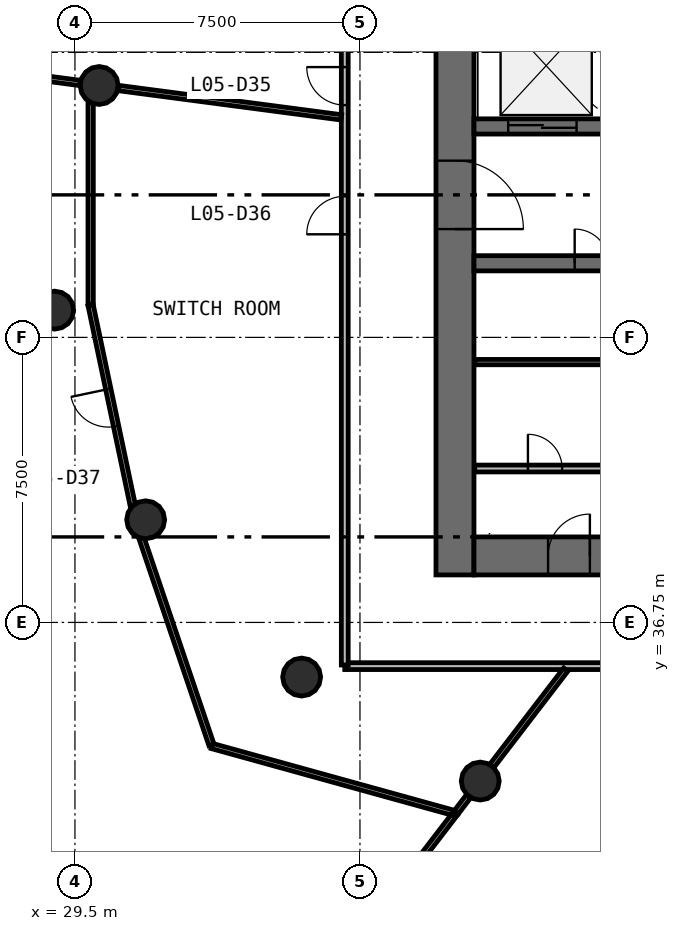
"""IFC4 building model, lengths in metres.
Left out: names, types, materials, properties, quantities, classifications, styles, units other than length and angle.
Written with IfcOpenShell. Run it as: python <this file> out.ifc"""

import sys

from ifc_helpers import new_model, si_unit, direction, frame, frame_2d, origin, origin_2d, place, context, subcontext, project, spatial, rectangle, circle, extrude, source, transform, mapped, element, fill, save


model = new_model("IFC4")
c1 = context("Model", 3, precision=1e-05, world=origin(), true_north=direction((0.0, 1.0)))
c2 = subcontext(c1, "Body", "Model", "MODEL_VIEW")
j1 = project(units=[si_unit("LENGTHUNIT", "METRE"), si_unit("PLANEANGLEUNIT", "RADIAN")], contexts=[c1])
p1 = place(None, origin())
s1 = spatial("IfcSite", under=j1, at=p1, CompositionType="ELEMENT")
p2 = place(p1, origin())
s2 = spatial("IfcBuilding", under=s1, at=p2, CompositionType="ELEMENT")
p3 = place(p2, frame((0.0, 0.0, 22.6)))
s3 = spatial("IfcBuildingStorey", under=s2, at=p3, CompositionType="ELEMENT", Elevation=22.6)
p4 = place(p3, frame((39.5, 58.0, 0.0), z_axis=(0.0, 0.0, 1.0), x_axis=(0.0, -1.0, 0.0)))
e1 = element("IfcWall", 1, at=p4, inside=s3, PredefinedType="SHEAR", context=c2, shape_type="SweptSolid", body=[
    extrude(rectangle(XDim=20.0, YDim=1.0, at=frame_2d((10.0, 0.0))), origin(), (0.0, 0.0, 1.0), 4.4),
])
p5 = place(p4, frame((9.1, 0.0, 0.0)))
e2 = element("IfcOpeningElement", 2, at=p5, cuts=e1, PredefinedType="OPENING", context=c2, shape_type="SweptSolid", body=[
    extrude(rectangle(XDim=1.8, YDim=2.1, at=frame_2d((0.9, 1.05))), frame((0.0, 0.51, 0.0), z_axis=(0.0, -1.0, 0.0), x_axis=(1.0, 0.0, 0.0)), (0.0, 0.0, 1.0), 1.02),
])
p6 = place(p3, frame((40.0, 38.5, 0.0), z_axis=(0.0, 0.0, 1.0), x_axis=(1.0, 0.0, 0.0)))
e3 = element("IfcWall", 3, at=p6, inside=s3, PredefinedType="SHEAR", context=c2, shape_type="SweptSolid", body=[
    extrude(rectangle(XDim=24.0, YDim=1.0, at=frame_2d((12.0, 0.0))), origin(), (0.0, 0.0, 1.0), 4.4),
])
p7 = place(p6, frame((21.45, 0.0, 0.0)))
e4 = element("IfcOpeningElement", 4, at=p7, cuts=e3, PredefinedType="OPENING", context=c2, shape_type="SweptSolid", body=[
    extrude(rectangle(XDim=1.1, YDim=2.1, at=frame_2d((0.55, 1.05))), frame((0.0, 0.51, 0.0), z_axis=(0.0, -1.0, 0.0), x_axis=(1.0, 0.0, 0.0)), (0.0, 0.0, 1.0), 1.02),
])
p8 = place(p6, frame((1.95, 0.0, 0.0)))
e5 = element("IfcOpeningElement", 5, at=p8, cuts=e3, PredefinedType="OPENING", context=c2, shape_type="SweptSolid", body=[
    extrude(rectangle(XDim=1.1, YDim=2.1, at=frame_2d((0.55, 1.05))), frame((0.0, 0.51, 0.0), z_axis=(0.0, -1.0, 0.0), x_axis=(1.0, 0.0, 0.0)), (0.0, 0.0, 1.0), 1.02),
])
p9 = place(p3, frame((40.0, 49.8, 0.0), z_axis=(0.0, 0.0, 1.0), x_axis=(1.0, 0.0, 0.0)))
e6 = element("IfcWall", 6, at=p9, inside=s3, PredefinedType="SHEAR", context=c2, shape_type="SweptSolid", body=[
    extrude(rectangle(XDim=24.0, YDim=0.4, at=frame_2d((12.0, 0.0))), origin(), (0.0, 0.0, 1.0), 4.4),
])
p10 = place(p9, frame((4.5, 0.0, 0.0)))
e7 = element("IfcOpeningElement", 7, at=p10, cuts=e6, PredefinedType="OPENING", context=c2, shape_type="SweptSolid", body=[
    extrude(rectangle(XDim=1.1, YDim=2.1, at=frame_2d((0.55, 1.05))), frame((0.0, 0.21, 0.0), z_axis=(0.0, -1.0, 0.0), x_axis=(1.0, 0.0, 0.0)), (0.0, 0.0, 1.0), 0.42),
])
p11 = place(p9, frame((7.0, 0.0, 0.0)))
e8 = element("IfcOpeningElement", 8, at=p11, cuts=e6, PredefinedType="OPENING", context=c2, shape_type="SweptSolid", body=[
    extrude(rectangle(XDim=1.1, YDim=2.1, at=frame_2d((0.55, 1.05))), frame((0.0, 0.21, 0.0), z_axis=(0.0, -1.0, 0.0), x_axis=(1.0, 0.0, 0.0)), (0.0, 0.0, 1.0), 0.42),
])
p12 = place(p9, frame((9.5, 0.0, 0.0)))
e9 = element("IfcOpeningElement", 9, at=p12, cuts=e6, PredefinedType="OPENING", context=c2, shape_type="SweptSolid", body=[
    extrude(rectangle(XDim=1.1, YDim=2.1, at=frame_2d((0.55, 1.05))), frame((0.0, 0.21, 0.0), z_axis=(0.0, -1.0, 0.0), x_axis=(1.0, 0.0, 0.0)), (0.0, 0.0, 1.0), 0.42),
])
p13 = place(p9, frame((0.9, 0.0, 0.0)))
e10 = element("IfcOpeningElement", 10, at=p13, cuts=e6, PredefinedType="OPENING", context=c2, shape_type="SweptSolid", body=[
    extrude(rectangle(XDim=1.8, YDim=2.4, at=frame_2d((0.9, 1.2))), frame((0.0, 0.21, 0.0), z_axis=(0.0, -1.0, 0.0), x_axis=(1.0, 0.0, 0.0)), (0.0, 0.0, 1.0), 0.42),
])
p14 = place(p9, frame((20.45, 0.0, 0.0)))
e11 = element("IfcOpeningElement", 11, at=p14, cuts=e6, PredefinedType="OPENING", context=c2, shape_type="SweptSolid", body=[
    extrude(rectangle(XDim=0.9, YDim=2.1, at=frame_2d((0.45, 1.05))), frame((0.0, 0.21, 0.0), z_axis=(0.0, -1.0, 0.0), x_axis=(1.0, 0.0, 0.0)), (0.0, 0.0, 1.0), 0.42),
])
p15 = place(p9, frame((11.65, 0.0, 0.0)))
e12 = element("IfcOpeningElement", 12, at=p15, cuts=e6, PredefinedType="OPENING", context=c2, shape_type="SweptSolid", body=[
    extrude(rectangle(XDim=0.9, YDim=2.1, at=frame_2d((0.45, 1.05))), frame((0.0, 0.21, 0.0), z_axis=(0.0, -1.0, 0.0), x_axis=(1.0, 0.0, 0.0)), (0.0, 0.0, 1.0), 0.42),
])
p16 = place(p3, frame((40.0, 46.2, 0.0), z_axis=(0.0, 0.0, 1.0), x_axis=(1.0, 0.0, 0.0)))
e13 = element("IfcWall", 13, at=p16, inside=s3, PredefinedType="SHEAR", context=c2, shape_type="SweptSolid", body=[
    extrude(rectangle(XDim=24.0, YDim=0.4, at=frame_2d((12.0, 0.0))), origin(), (0.0, 0.0, 1.0), 4.4),
])
p17 = place(p16, frame((4.5, 0.0, 0.0)))
e14 = element("IfcOpeningElement", 14, at=p17, cuts=e13, PredefinedType="OPENING", context=c2, shape_type="SweptSolid", body=[
    extrude(rectangle(XDim=1.1, YDim=2.1, at=frame_2d((0.55, 1.05))), frame((0.0, 0.21, 0.0), z_axis=(0.0, -1.0, 0.0), x_axis=(1.0, 0.0, 0.0)), (0.0, 0.0, 1.0), 0.42),
])
p18 = place(p16, frame((7.0, 0.0, 0.0)))
e15 = element("IfcOpeningElement", 15, at=p18, cuts=e13, PredefinedType="OPENING", context=c2, shape_type="SweptSolid", body=[
    extrude(rectangle(XDim=1.1, YDim=2.1, at=frame_2d((0.55, 1.05))), frame((0.0, 0.21, 0.0), z_axis=(0.0, -1.0, 0.0), x_axis=(1.0, 0.0, 0.0)), (0.0, 0.0, 1.0), 0.42),
])
p19 = place(p16, frame((9.5, 0.0, 0.0)))
e16 = element("IfcOpeningElement", 16, at=p19, cuts=e13, PredefinedType="OPENING", context=c2, shape_type="SweptSolid", body=[
    extrude(rectangle(XDim=1.1, YDim=2.1, at=frame_2d((0.55, 1.05))), frame((0.0, 0.21, 0.0), z_axis=(0.0, -1.0, 0.0), x_axis=(1.0, 0.0, 0.0)), (0.0, 0.0, 1.0), 0.42),
])
p20 = place(p16, frame((20.45, 0.0, 0.0)))
e17 = element("IfcOpeningElement", 17, at=p20, cuts=e13, PredefinedType="OPENING", context=c2, shape_type="SweptSolid", body=[
    extrude(rectangle(XDim=0.9, YDim=2.1, at=frame_2d((0.45, 1.05))), frame((0.0, 0.21, 0.0), z_axis=(0.0, -1.0, 0.0), x_axis=(1.0, 0.0, 0.0)), (0.0, 0.0, 1.0), 0.42),
])
p21 = place(p16, frame((2.65, 0.0, 0.0)))
e18 = element("IfcOpeningElement", 18, at=p21, cuts=e13, PredefinedType="OPENING", context=c2, shape_type="SweptSolid", body=[
    extrude(rectangle(XDim=0.9, YDim=2.1, at=frame_2d((0.45, 1.05))), frame((0.0, 0.21, 0.0), z_axis=(0.0, -1.0, 0.0), x_axis=(1.0, 0.0, 0.0)), (0.0, 0.0, 1.0), 0.42),
])
p22 = place(p16, frame((11.65, 0.0, 0.0)))
e19 = element("IfcOpeningElement", 19, at=p22, cuts=e13, PredefinedType="OPENING", context=c2, shape_type="SweptSolid", body=[
    extrude(rectangle(XDim=0.9, YDim=2.1, at=frame_2d((0.45, 1.05))), frame((0.0, 0.21, 0.0), z_axis=(0.0, -1.0, 0.0), x_axis=(1.0, 0.0, 0.0)), (0.0, 0.0, 1.0), 0.42),
])
m1 = source(origin(), c2, "Body", "SweptSolid", [
    extrude(circle(Radius=0.5, at=origin_2d()), origin(), (0.0, 0.0, 1.0), 4.4),
])
for number, where, z_axis, x_axis in (
    (20, (30.137, 50.878, 0.0), (0.0, 0.0, 1.0), (1.0, 0.0, 0.0)),
    (21, (28.966, 44.968, 0.0), (0.0, 0.0, 1.0), (1.0, 0.0, 0.0)),
    (22, (31.361, 39.451, 0.0), (0.0, 0.0, 1.0), (1.0, 0.0, 0.0)),
    (23, (35.465, 35.312, 0.0), (0.0, 0.0, 1.0), (1.0, 0.0, 0.0)),
    (24, (40.165, 32.576, 0.0), (0.0, 0.0, 1.0), (1.0, 0.0, 0.0)),
):
    element("IfcColumn", number, at=place(p3, frame(where, z_axis=z_axis, x_axis=x_axis)), inside=s3, PredefinedType="COLUMN", context=c2, shape_type="MappedRepresentation", body=[
        mapped(m1, transform((0.0, 0.0, 0.0), scale=1.0)),
    ])
p23 = place(p3, frame((67.4, 35.6, 0.0), z_axis=(0.0, 0.0, 1.0), x_axis=(-1.0, 0.0, 0.0)))
e25 = element("IfcWall", 25, at=p23, inside=s3, PredefinedType="PARTITIONING", context=c2, shape_type="SweptSolid", body=[
    extrude(rectangle(XDim=30.8, YDim=0.18, at=frame_2d((15.4, 0.0))), origin(), (0.0, 0.0, 1.0), 3.05),
])
p24 = place(p23, frame((14.95, 0.0, 0.0)))
e26 = element("IfcOpeningElement", 26, at=p24, cuts=e25, PredefinedType="OPENING", context=c2, shape_type="SweptSolid", body=[
    extrude(rectangle(XDim=1.0, YDim=2.1, at=frame_2d((0.5, 1.05))), frame((0.0, 0.1, 0.0), z_axis=(0.0, -1.0, 0.0), x_axis=(1.0, 0.0, 0.0)), (0.0, 0.0, 1.0), 0.2),
])
p25 = place(p23, frame((12.55, 0.0, 0.0)))
e27 = element("IfcOpeningElement", 27, at=p25, cuts=e25, PredefinedType="OPENING", context=c2, shape_type="SweptSolid", body=[
    extrude(rectangle(XDim=1.0, YDim=2.1, at=frame_2d((0.5, 1.05))), frame((0.0, 0.1, 0.0), z_axis=(0.0, -1.0, 0.0), x_axis=(1.0, 0.0, 0.0)), (0.0, 0.0, 1.0), 0.2),
])
p26 = place(p23, frame((8.95, 0.0, 0.0)))
e28 = element("IfcOpeningElement", 28, at=p26, cuts=e25, PredefinedType="OPENING", context=c2, shape_type="SweptSolid", body=[
    extrude(rectangle(XDim=1.0, YDim=2.1, at=frame_2d((0.5, 1.05))), frame((0.0, 0.1, 0.0), z_axis=(0.0, -1.0, 0.0), x_axis=(1.0, 0.0, 0.0)), (0.0, 0.0, 1.0), 0.2),
])
p27 = place(p3, frame((36.6, 35.63, 0.0), z_axis=(0.0, 0.0, 1.0), x_axis=(0.0, 1.0, 0.0)))
e29 = element("IfcWall", 29, at=p27, inside=s3, PredefinedType="PARTITIONING", context=c2, shape_type="SweptSolid", body=[
    extrude(rectangle(XDim=23.583, YDim=0.18, at=frame_2d((11.791, 0.0))), origin(), (0.0, 0.0, 1.0), 3.05),
])
p28 = place(p27, frame((14.732, 0.0, 0.0)))
e30 = element("IfcOpeningElement", 30, at=p28, cuts=e29, PredefinedType="OPENING", context=c2, shape_type="SweptSolid", body=[
    extrude(rectangle(XDim=1.0, YDim=2.1, at=frame_2d((0.5, 1.05))), frame((0.0, 0.1, 0.0), z_axis=(0.0, -1.0, 0.0), x_axis=(1.0, 0.0, 0.0)), (0.0, 0.0, 1.0), 0.2),
])
p29 = place(p27, frame((11.333, 0.0, 0.0)))
e31 = element("IfcOpeningElement", 31, at=p29, cuts=e29, PredefinedType="OPENING", context=c2, shape_type="SweptSolid", body=[
    extrude(rectangle(XDim=1.0, YDim=2.1, at=frame_2d((0.5, 1.05))), frame((0.0, 0.1, 0.0), z_axis=(0.0, -1.0, 0.0), x_axis=(1.0, 0.0, 0.0)), (0.0, 0.0, 1.0), 0.2),
])
p30 = place(p3, frame((40.02, 40.8, 0.0), z_axis=(0.0, 0.0, 1.0), x_axis=(1.0, 0.0, 0.0)))
e32 = element("IfcWall", 32, at=p30, inside=s3, PredefinedType="PARTITIONING", context=c2, shape_type="SweptSolid", body=[
    extrude(rectangle(XDim=3.75, YDim=0.18, at=frame_2d((1.875, 0.0))), origin(), (0.0, 0.0, 1.0), 3.95),
])
p31 = place(p30, frame((1.4, 0.0, 0.0)))
e33 = element("IfcOpeningElement", 33, at=p31, cuts=e32, PredefinedType="OPENING", context=c2, shape_type="SweptSolid", body=[
    extrude(rectangle(XDim=0.9, YDim=2.1, at=frame_2d((0.45, 1.05))), frame((0.0, 0.1, 0.0), z_axis=(0.0, -1.0, 0.0), x_axis=(1.0, 0.0, 0.0)), (0.0, 0.0, 1.0), 0.2),
])
p32 = place(p3, frame((29.637, 50.944, 0.0), z_axis=(0.0, 0.0, 1.0), x_axis=(-0.991443306772, 0.130538000051, 0.0)))
e34 = element("IfcWall", 34, at=p32, inside=s3, PredefinedType="PARTITIONING", context=c2, shape_type="SweptSolid", body=[
    extrude(rectangle(XDim=11.195, YDim=0.14, at=frame_2d((5.598, 0.0))), origin(), (0.0, 0.0, 1.0), 3.05),
])
p33 = place(p3, frame((39.512, 31.726, 0.0), z_axis=(0.0, 0.0, 1.0), x_axis=(-0.608766118587, -0.793349741829, 0.0)))
e35 = element("IfcWall", 35, at=p33, inside=s3, PredefinedType="PARTITIONING", context=c2, shape_type="SweptSolid", body=[
    extrude(rectangle(XDim=9.159, YDim=0.14, at=frame_2d((4.58, 0.0))), origin(), (0.0, 0.0, 1.0), 3.05),
])
p34 = place(p3, frame((33.102, 33.499, 0.0), z_axis=(0.0, 0.0, 1.0), x_axis=(0.963800361675, -0.266624947885, 0.0)))
e36 = element("IfcWall", 36, at=p34, inside=s3, PredefinedType="PARTITIONING", context=c2, shape_type="SweptSolid", body=[
    extrude(rectangle(XDim=6.575, YDim=0.14, at=frame_2d((3.288, 0.0))), origin(), (0.0, 0.0, 1.0), 3.05),
])
p35 = place(p3, frame((36.51, 50.039, 0.0), z_axis=(0.0, 0.0, 1.0), x_axis=(-0.991445034615, 0.130524876315, 0.0)))
e37 = element("IfcWall", 37, at=p35, inside=s3, PredefinedType="PARTITIONING", context=c2, shape_type="SweptSolid", body=[
    extrude(rectangle(XDim=5.924, YDim=0.14, at=frame_2d((2.962, 0.0))), origin(), (0.0, 0.0, 1.0), 3.05),
])
p36 = place(p3, frame((31.255, 38.957, 0.0), z_axis=(0.0, 0.0, 1.0), x_axis=(0.320466828711, -0.947259738243, 0.0)))
e38 = element("IfcWall", 38, at=p36, inside=s3, PredefinedType="PARTITIONING", context=c2, shape_type="SweptSolid", body=[
    extrude(rectangle(XDim=5.732, YDim=0.14, at=frame_2d((2.866, 0.0))), origin(), (0.0, 0.0, 1.0), 3.05),
])
p37 = place(p3, frame((31.022, 39.825, 0.0), z_axis=(0.0, 0.0, 1.0), x_axis=(-0.205996766631, 0.978552672133, 0.0)))
e39 = element("IfcWall", 39, at=p37, inside=s3, PredefinedType="PARTITIONING", context=c2, shape_type="SweptSolid", body=[
    extrude(rectangle(XDim=5.383, YDim=0.14, at=frame_2d((2.691, 0.0))), origin(), (0.0, 0.0, 1.0), 3.05),
])
p38 = place(p37, frame((2.133, 0.0, 0.0)))
e40 = element("IfcOpeningElement", 40, at=p38, cuts=e39, PredefinedType="OPENING", context=c2, shape_type="SweptSolid", body=[
    extrude(rectangle(XDim=1.0, YDim=2.1, at=frame_2d((0.5, 1.05))), frame((0.0, 0.08, 0.0), z_axis=(0.0, -1.0, 0.0), x_axis=(1.0, 0.0, 0.0)), (0.0, 0.0, 1.0), 0.16),
])
p39 = place(p3, frame((29.913, 50.426, 0.0), z_axis=(0.0, 0.0, 1.0), x_axis=(0.0, -1.0, 0.0)))
e41 = element("IfcWall", 41, at=p39, inside=s3, PredefinedType="PARTITIONING", context=c2, shape_type="SweptSolid", body=[
    extrude(rectangle(XDim=5.304, YDim=0.14, at=frame_2d((2.652, 0.0))), origin(), (0.0, 0.0, 1.0), 3.05),
])
p40 = place(p3, frame((43.77, 43.6, 0.0), z_axis=(0.0, 0.0, 1.0), x_axis=(-1.0, 0.0, 0.0)))
e42 = element("IfcWall", 42, at=p40, inside=s3, PredefinedType="PARTITIONING", context=c2, shape_type="SweptSolid", body=[
    extrude(rectangle(XDim=3.75, YDim=0.14, at=frame_2d((1.875, 0.0))), origin(), (0.0, 0.0, 1.0), 3.05),
])
p41 = place(p3, frame((42.416, 35.51, 0.0), z_axis=(0.0, 0.0, 1.0), x_axis=(-0.60874605662, -0.793365135703, 0.0)))
e43 = element("IfcWall", 43, at=p41, inside=s3, PredefinedType="PARTITIONING", context=c2, shape_type="SweptSolid", body=[
    extrude(rectangle(XDim=3.194, YDim=0.14, at=frame_2d((1.597, 0.0))), origin(), (0.0, 0.0, 1.0), 3.05),
])
p42 = place(p3, frame((39.858, 32.176, 0.0), z_axis=(0.0, 0.0, 1.0), x_axis=(-0.608898529008, -0.793248120938, 0.0)))
e44 = element("IfcWall", 44, at=p42, inside=s3, PredefinedType="PARTITIONING", context=c2, shape_type="SweptSolid", body=[
    extrude(rectangle(XDim=0.538, YDim=0.14, at=frame_2d((0.269, 0.0))), origin(), (0.0, 0.0, 1.0), 3.05),
])
m2 = source(origin(), c2, "Body", "SweptSolid", [
    extrude(rectangle(XDim=1.8, YDim=2.1, at=frame_2d((0.9, 1.05))), frame((0.0, 0.025, 0.0), z_axis=(0.0, -1.0, 0.0), x_axis=(1.0, 0.0, 0.0)), (0.0, 0.0, 1.0), 0.05),
])
p43 = place(p5, origin())
e45 = element("IfcDoor", 45, at=p43, inside=s3, OperationType="SINGLE_SWING_RIGHT", PredefinedType="DOOR", context=c2, shape_type="MappedRepresentation", body=[
    mapped(m2, transform((0.0, 0.0, 0.0), scale=1.0)),
])
fill(e2, e45)
m3 = source(origin(), c2, "Body", "SweptSolid", [
    extrude(rectangle(XDim=1.8, YDim=2.4, at=frame_2d((0.9, 1.2))), frame((0.0, 0.025, 0.0), z_axis=(0.0, -1.0, 0.0), x_axis=(1.0, 0.0, 0.0)), (0.0, 0.0, 1.0), 0.05),
])
p44 = place(p13, origin())
e46 = element("IfcDoor", 46, at=p44, inside=s3, OperationType="DOUBLE_DOOR_SLIDING", PredefinedType="USERDEFINED", context=c2, shape_type="MappedRepresentation", body=[
    mapped(m3, transform((0.0, 0.0, 0.0), scale=1.0)),
])
fill(e10, e46)
m4 = source(origin(), c2, "Body", "SweptSolid", [
    extrude(rectangle(XDim=1.1, YDim=2.1, at=frame_2d((0.55, 1.05))), frame((0.0, 0.025, 0.0), z_axis=(0.0, -1.0, 0.0), x_axis=(1.0, 0.0, 0.0)), (0.0, 0.0, 1.0), 0.05),
])
p45 = place(p8, origin())
e47 = element("IfcDoor", 47, at=p45, inside=s3, OperationType="SINGLE_SWING_RIGHT", PredefinedType="DOOR", context=c2, shape_type="MappedRepresentation", body=[
    mapped(m4, transform((0.0, 0.0, 0.0), scale=1.0)),
])
fill(e5, e47)
m5 = source(origin(), c2, "Body", "SweptSolid", [
    extrude(rectangle(XDim=1.0, YDim=2.1, at=frame_2d((0.5, 1.05))), frame((0.0, 0.025, 0.0), z_axis=(0.0, -1.0, 0.0), x_axis=(1.0, 0.0, 0.0)), (0.0, 0.0, 1.0), 0.05),
])
p46 = place(p28, origin())
e48 = element("IfcDoor", 48, at=p46, inside=s3, OperationType="SINGLE_SWING_RIGHT", PredefinedType="DOOR", context=c2, shape_type="MappedRepresentation", body=[
    mapped(m5, transform((0.0, 0.0, 0.0), scale=1.0)),
])
fill(e30, e48)
p47 = place(p29, origin())
e49 = element("IfcDoor", 49, at=p47, inside=s3, OperationType="SINGLE_SWING_LEFT", PredefinedType="DOOR", context=c2, shape_type="MappedRepresentation", body=[
    mapped(m5, transform((0.0, 0.0, 0.0), scale=1.0)),
])
fill(e31, e49)
p48 = place(p38, origin())
e50 = element("IfcDoor", 50, at=p48, inside=s3, OperationType="SINGLE_SWING_RIGHT", PredefinedType="DOOR", context=c2, shape_type="MappedRepresentation", body=[
    mapped(m5, transform((0.0, 0.0, 0.0), scale=1.0)),
])
fill(e40, e50)
m6 = source(origin(), c2, "Body", "SweptSolid", [
    extrude(rectangle(XDim=0.9, YDim=2.1, at=frame_2d((0.45, 1.05))), frame((0.0, 0.025, 0.0), z_axis=(0.0, -1.0, 0.0), x_axis=(1.0, 0.0, 0.0)), (0.0, 0.0, 1.0), 0.05),
])
p49 = place(p31, origin())
e51 = element("IfcDoor", 51, at=p49, inside=s3, OperationType="SINGLE_SWING_LEFT", PredefinedType="DOOR", context=c2, shape_type="MappedRepresentation", body=[
    mapped(m6, transform((0.0, 0.0, 0.0), scale=1.0)),
])
fill(e33, e51)
p50 = place(p21, origin())
e52 = element("IfcDoor", 52, at=p50, inside=s3, OperationType="SINGLE_SWING_LEFT", PredefinedType="DOOR", context=c2, shape_type="MappedRepresentation", body=[
    mapped(m6, transform((0.0, 0.0, 0.0), scale=1.0)),
])
fill(e18, e52)
save(model, sys.argv[1])
